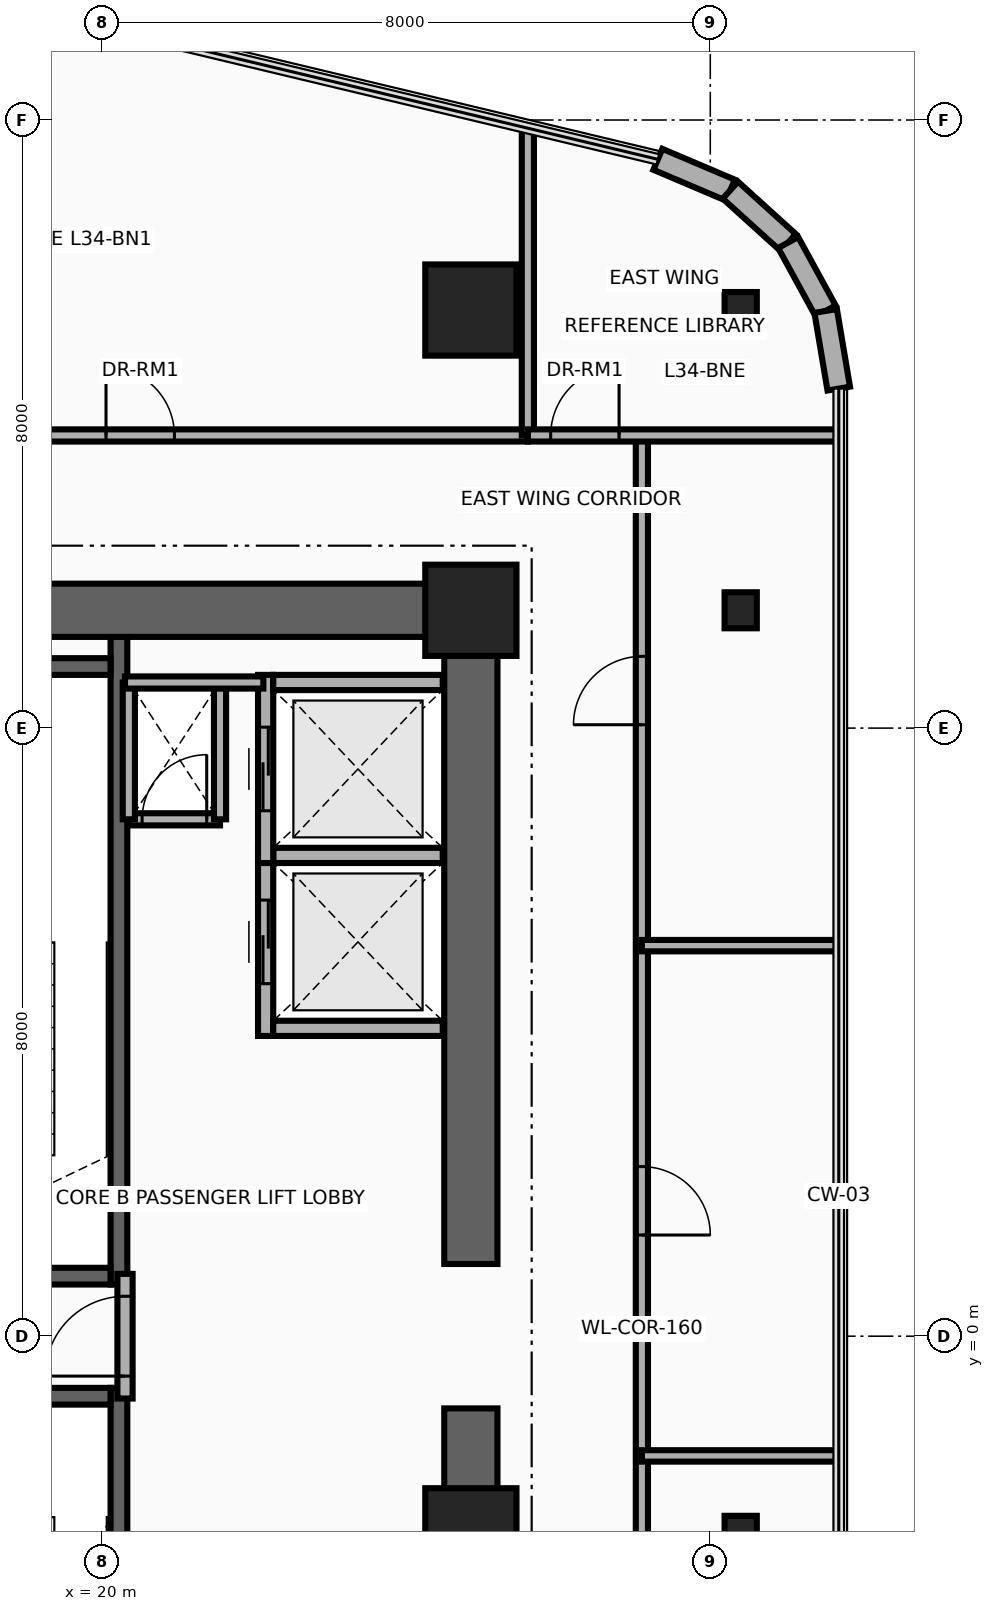
"""IFC4 building model, lengths in metres.
Left out: names, types, materials, properties, quantities, classifications, styles, units other than length and angle.
Written with IfcOpenShell. Run it as: python <this file> out.ifc"""

import sys

from ifc_helpers import new_model, si_unit, direction, frame, frame_2d, origin, origin_2d, place, context, subcontext, project, spatial, rectangle, i_section, extrude, source, transform, mapped, element, fill, save


model = new_model("IFC4")
c1 = context("Model", 3, precision=1e-05, world=origin(), true_north=direction((0.0, 1.0)))
c2 = subcontext(c1, "Body", "Model", "MODEL_VIEW")
j1 = project(units=[si_unit("LENGTHUNIT", "METRE"), si_unit("PLANEANGLEUNIT", "RADIAN")], contexts=[c1])
p1 = place(None, origin())
s1 = spatial("IfcSite", under=j1, at=p1, CompositionType="ELEMENT")
p2 = place(p1, origin())
s2 = spatial("IfcBuilding", under=s1, at=p2, CompositionType="ELEMENT")
p3 = place(p2, frame((0.0, 0.0, 135.3)))
s3 = spatial("IfcBuildingStorey", under=s2, at=p3, CompositionType="ELEMENT", Elevation=135.3)
p4 = place(p3, frame((20.22, 0.68, 0.0), z_axis=(0.0, 0.0, 1.0), x_axis=(0.0, 1.0, 0.0)))
e1 = element("IfcWall", 1, at=p4, inside=s3, PredefinedType="SHEAR", context=c2, shape_type="SweptSolid", body=[
    extrude(rectangle(XDim=8.52, YDim=0.22, at=frame_2d((4.26, 0.0))), origin(), (0.0, 0.0, 1.0), 3.46),
])
p5 = place(p3, frame((17.0, 0.79, 0.0), z_axis=(0.0, 0.0, 1.0), x_axis=(1.0, 0.0, 0.0)))
e2 = element("IfcWall", 2, at=p5, inside=s3, PredefinedType="SHEAR", context=c2, shape_type="SweptSolid", body=[
    extrude(rectangle(XDim=3.11, YDim=0.22, at=frame_2d((1.555, 0.0))), origin(), (0.0, 0.0, 1.0), 3.46),
])
p6 = place(p5, frame((0.95, 0.0, 0.0)))
e3 = element("IfcOpeningElement", 3, at=p6, cuts=e2, PredefinedType="OPENING", context=c2, shape_type="SweptSolid", body=[
    extrude(rectangle(XDim=1.1, YDim=2.15, at=frame_2d((0.55, 1.075))), frame((0.0, 0.125, 0.0), z_axis=(0.0, -1.0, 0.0), x_axis=(1.0, 0.0, 0.0)), (0.0, 0.0, 1.0), 0.25),
])
p7 = place(p3, frame((17.0, 8.81, 0.0), z_axis=(0.0, 0.0, 1.0), x_axis=(1.0, 0.0, 0.0)))
e4 = element("IfcWall", 4, at=p7, inside=s3, PredefinedType="SHEAR", context=c2, shape_type="SweptSolid", body=[
    extrude(rectangle(XDim=3.11, YDim=0.22, at=frame_2d((1.555, 0.0))), origin(), (0.0, 0.0, 1.0), 3.46),
])
p8 = place(p3, frame((20.22, -9.2, 0.0), z_axis=(0.0, 0.0, 1.0), x_axis=(0.0, 1.0, 0.0)))
e5 = element("IfcWall", 5, at=p8, inside=s3, PredefinedType="SHEAR", context=c2, shape_type="SweptSolid", body=[
    extrude(rectangle(XDim=8.52, YDim=0.22, at=frame_2d((4.26, 0.0))), origin(), (0.0, 0.0, 1.0), 3.46),
])
p9 = place(p3, frame((17.0, -0.79, 0.0), z_axis=(0.0, 0.0, 1.0), x_axis=(1.0, 0.0, 0.0)))
e6 = element("IfcWall", 6, at=p9, inside=s3, PredefinedType="SHEAR", context=c2, shape_type="SweptSolid", body=[
    extrude(rectangle(XDim=3.11, YDim=0.22, at=frame_2d((1.555, 0.0))), origin(), (0.0, 0.0, 1.0), 3.46),
])
p10 = place(p9, frame((0.95, 0.0, 0.0)))
e7 = element("IfcOpeningElement", 7, at=p10, cuts=e6, PredefinedType="OPENING", context=c2, shape_type="SweptSolid", body=[
    extrude(rectangle(XDim=1.1, YDim=2.15, at=frame_2d((0.55, 1.075))), frame((0.0, 0.125, 0.0), z_axis=(0.0, -1.0, 0.0), x_axis=(1.0, 0.0, 0.0)), (0.0, 0.0, 1.0), 0.25),
])
for number, where, z_axis, x_axis in (
    (8, (24.85, -9.9, 0.0), (0.0, 0.0, 1.0), (0.0, 1.0, 0.0)),
    (9, (24.85, 0.95, 0.0), (0.0, 0.0, 1.0), (0.0, 1.0, 0.0)),
):
    element("IfcWall", number, at=place(p3, frame(where, z_axis=z_axis, x_axis=x_axis)), inside=s3, PredefinedType="SHEAR", context=c2, shape_type="SweptSolid", body=[
        extrude(rectangle(XDim=8.95, YDim=0.7, at=frame_2d((4.475, 0.0))), origin(), (0.0, 0.0, 1.0), 3.46),
    ])
p11 = place(p3, frame((15.85, 9.55, 0.0), z_axis=(0.0, 0.0, 1.0), x_axis=(1.0, 0.0, 0.0)))
e10 = element("IfcWall", 10, at=p11, inside=s3, PredefinedType="SHEAR", context=c2, shape_type="SweptSolid", body=[
    extrude(rectangle(XDim=9.0, YDim=0.7, at=frame_2d((4.5, 0.0))), origin(), (0.0, 0.0, 1.0), 3.46),
])
m1 = source(origin(), c2, "Body", "SweptSolid", [
    extrude(rectangle(XDim=1.2, YDim=1.2, at=origin_2d()), origin(), (0.0, 0.0, 1.0), 3.7),
])
p12 = place(p3, frame((24.85, -2.6, 0.0), z_axis=(0.0, 0.0, 1.0), x_axis=(1.0, 0.0, 0.0)))
e11 = element("IfcColumn", 11, at=p12, inside=s3, PredefinedType="COLUMN", context=c2, shape_type="MappedRepresentation", body=[
    mapped(m1, transform((0.0, 0.0, 0.0), x_axis=(1.0, 0.0, 0.0), y_axis=(0.0, 1.0, 0.0), z_axis=(0.0, 0.0, 1.0), scale=1.0)),
])
m2 = source(origin(), c2, "Body", "SweptSolid", [
    extrude(i_section(OverallWidth=0.424, OverallDepth=0.474, WebThickness=0.048, FlangeThickness=0.077, at=origin_2d()), origin(), (0.0, 0.0, 1.0), 3.7),
])
p13 = place(p3, frame((28.4, -2.6, 0.0), z_axis=(0.0, 0.0, 1.0), x_axis=(1.0, 0.0, 0.0)))
e12 = element("IfcColumn", 12, at=p13, inside=s3, PredefinedType="COLUMN", context=c2, shape_type="MappedRepresentation", body=[
    mapped(m2, transform((0.0, 0.0, 0.0), x_axis=(1.0, 0.0, 0.0), y_axis=(0.0, 1.0, 0.0), z_axis=(0.0, 0.0, 1.0), scale=1.0)),
])
p14 = place(p3, frame((24.85, 9.55, 0.0), z_axis=(0.0, 0.0, 1.0), x_axis=(1.0, 0.0, 0.0)))
e13 = element("IfcColumn", 13, at=p14, inside=s3, PredefinedType="COLUMN", context=c2, shape_type="MappedRepresentation", body=[
    mapped(m1, transform((0.0, 0.0, 0.0), x_axis=(1.0, 0.0, 0.0), y_axis=(0.0, 1.0, 0.0), z_axis=(0.0, 0.0, 1.0), scale=1.0)),
])
p15 = place(p3, frame((28.4, 9.55, 0.0), z_axis=(0.0, 0.0, 1.0), x_axis=(1.0, 0.0, 0.0)))
e14 = element("IfcColumn", 14, at=p15, inside=s3, PredefinedType="COLUMN", context=c2, shape_type="MappedRepresentation", body=[
    mapped(m2, transform((0.0, 0.0, 0.0), x_axis=(1.0, 0.0, 0.0), y_axis=(0.0, 1.0, 0.0), z_axis=(0.0, 0.0, 1.0), scale=1.0)),
])
p16 = place(p3, frame((24.85, 13.5, 0.0), z_axis=(0.0, 0.0, 1.0), x_axis=(1.0, 0.0, 0.0)))
e15 = element("IfcColumn", 15, at=p16, inside=s3, PredefinedType="COLUMN", context=c2, shape_type="MappedRepresentation", body=[
    mapped(m1, transform((0.0, 0.0, 0.0), x_axis=(1.0, 0.0, 0.0), y_axis=(0.0, 1.0, 0.0), z_axis=(0.0, 0.0, 1.0), scale=1.0)),
])
p17 = place(p3, frame((28.4, 13.5, 0.0), z_axis=(0.0, 0.0, 1.0), x_axis=(1.0, 0.0, 0.0)))
e16 = element("IfcColumn", 16, at=p17, inside=s3, PredefinedType="COLUMN", context=c2, shape_type="MappedRepresentation", body=[
    mapped(m2, transform((0.0, 0.0, 0.0), x_axis=(1.0, 0.0, 0.0), y_axis=(0.0, 1.0, 0.0), z_axis=(0.0, 0.0, 1.0), scale=1.0)),
])
p18 = place(p3, frame((27.31, 15.483, 0.0), z_axis=(0.0, 0.0, 1.0), x_axis=(0.920250328759, -0.391330208927, 0.0)))
e17 = element("IfcWall", 17, at=p18, inside=s3, PredefinedType="SOLIDWALL", context=c2, shape_type="SweptSolid", body=[
    extrude(rectangle(XDim=1.036, YDim=0.3, at=frame_2d((0.518, 0.0))), origin(), (0.0, 0.0, 1.0), 3.46),
])
p19 = place(p3, frame((28.264, 15.077, 0.0), z_axis=(0.0, 0.0, 1.0), x_axis=(0.741208839713, -0.671274501178, 0.0)))
e18 = element("IfcWall", 18, at=p19, inside=s3, PredefinedType="SOLIDWALL", context=c2, shape_type="SweptSolid", body=[
    extrude(rectangle(XDim=1.026, YDim=0.3, at=frame_2d((0.513, 0.0))), origin(), (0.0, 0.0, 1.0), 3.46),
])
p20 = place(p3, frame((29.025, 14.388, 0.0), z_axis=(0.0, 0.0, 1.0), x_axis=(0.480284137298, -0.87711296163, 0.0)))
e19 = element("IfcWall", 19, at=p20, inside=s3, PredefinedType="SOLIDWALL", context=c2, shape_type="SweptSolid", body=[
    extrude(rectangle(XDim=1.027, YDim=0.3, at=frame_2d((0.513, 0.0))), origin(), (0.0, 0.0, 1.0), 3.46),
])
p21 = place(p3, frame((29.518, 13.488, 0.0), z_axis=(0.0, 0.0, 1.0), x_axis=(0.166156796952, -0.986099345313, 0.0)))
e20 = element("IfcWall", 20, at=p21, inside=s3, PredefinedType="SOLIDWALL", context=c2, shape_type="SweptSolid", body=[
    extrude(rectangle(XDim=1.036, YDim=0.3, at=frame_2d((0.518, 0.0))), origin(), (0.0, 0.0, 1.0), 3.46),
])
p22 = place(p3, frame((22.15, 3.95, 0.0), z_axis=(0.0, 0.0, 1.0), x_axis=(0.0, 1.0, 0.0)))
e21 = element("IfcWall", 21, at=p22, inside=s3, PredefinedType="MOVABLE", context=c2, shape_type="SweptSolid", body=[
    extrude(rectangle(XDim=2.475, YDim=0.2, at=frame_2d((1.238, 0.0))), origin(), (0.0, 0.0, 1.0), 3.46),
])
p23 = place(p22, frame((0.688, 0.0, 0.0)))
e22 = element("IfcOpeningElement", 22, at=p23, cuts=e21, PredefinedType="OPENING", context=c2, shape_type="SweptSolid", body=[
    extrude(rectangle(XDim=1.1, YDim=2.1, at=frame_2d((0.55, 1.05))), frame((0.0, 0.115, 0.0), z_axis=(0.0, -1.0, 0.0), x_axis=(1.0, 0.0, 0.0)), (0.0, 0.0, 1.0), 0.23),
])
for number, where, z_axis, x_axis in (
    (23, (22.25, 4.05, 0.0), (0.0, 0.0, 1.0), (1.0, 0.0, 0.0)),
    (24, (22.25, 6.325, 0.0), (0.0, 0.0, 1.0), (1.0, 0.0, 0.0)),
):
    element("IfcWall", number, at=place(p3, frame(where, z_axis=z_axis, x_axis=x_axis)), inside=s3, PredefinedType="MOVABLE", context=c2, shape_type="SweptSolid", body=[
        extrude(rectangle(XDim=2.23, YDim=0.2, at=frame_2d((1.115, 0.0))), origin(), (0.0, 0.0, 1.0), 2.245),
    ])
p24 = place(p3, frame((22.15, 6.225, 0.0), z_axis=(0.0, 0.0, 1.0), x_axis=(0.0, 1.0, 0.0)))
e25 = element("IfcWall", 25, at=p24, inside=s3, PredefinedType="MOVABLE", context=c2, shape_type="SweptSolid", body=[
    extrude(rectangle(XDim=2.475, YDim=0.2, at=frame_2d((1.237, 0.0))), origin(), (0.0, 0.0, 1.0), 3.46),
])
p25 = place(p24, frame((0.688, 0.0, 0.0)))
e26 = element("IfcOpeningElement", 26, at=p25, cuts=e25, PredefinedType="OPENING", context=c2, shape_type="SweptSolid", body=[
    extrude(rectangle(XDim=1.1, YDim=2.1, at=frame_2d((0.55, 1.05))), frame((0.0, 0.115, 0.0), z_axis=(0.0, -1.0, 0.0), x_axis=(1.0, 0.0, 0.0)), (0.0, 0.0, 1.0), 0.23),
])
p26 = place(p3, frame((22.25, 8.6, 0.0), z_axis=(0.0, 0.0, 1.0), x_axis=(1.0, 0.0, 0.0)))
e27 = element("IfcWall", 27, at=p26, inside=s3, PredefinedType="MOVABLE", context=c2, shape_type="SweptSolid", body=[
    extrude(rectangle(XDim=2.23, YDim=0.2, at=frame_2d((1.115, 0.0))), origin(), (0.0, 0.0, 1.0), 2.245),
])
p27 = place(p3, frame((20.3, -0.82, 0.0), z_axis=(0.0, 0.0, 1.0), x_axis=(0.0, 1.0, 0.0)))
e28 = element("IfcWall", 28, at=p27, inside=s3, PredefinedType="PARTITIONING", context=c2, shape_type="SweptSolid", body=[
    extrude(rectangle(XDim=1.64, YDim=0.2, at=frame_2d((0.82, 0.0))), origin(), (0.0, 0.0, 1.0), 3.46),
])
p28 = place(p27, frame((0.295, 0.0, 0.0)))
e29 = element("IfcOpeningElement", 29, at=p28, cuts=e28, PredefinedType="OPENING", context=c2, shape_type="SweptSolid", body=[
    extrude(rectangle(XDim=1.05, YDim=2.15, at=frame_2d((0.525, 1.075))), frame((0.0, 0.115, 0.0), z_axis=(0.0, -1.0, 0.0), x_axis=(1.0, 0.0, 0.0)), (0.0, 0.0, 1.0), 0.23),
])
p29 = place(p3, frame((20.35, 6.8, 0.0), z_axis=(0.0, 0.0, 1.0), x_axis=(1.0, 0.0, 0.0)))
e30 = element("IfcWall", 30, at=p29, inside=s3, PredefinedType="PARTITIONING", context=c2, shape_type="SweptSolid", body=[
    extrude(rectangle(XDim=1.2, YDim=0.16, at=frame_2d((0.6, 0.0))), origin(), (0.0, 0.0, 1.0), 3.46),
])
p30 = place(p29, frame((0.175, 0.0, 0.0)))
e31 = element("IfcOpeningElement", 31, at=p30, cuts=e30, PredefinedType="OPENING", context=c2, shape_type="SweptSolid", body=[
    extrude(rectangle(XDim=0.85, YDim=2.05, at=frame_2d((0.425, 1.025))), frame((0.0, 0.095, 0.0), z_axis=(0.0, -1.0, 0.0), x_axis=(1.0, 0.0, 0.0)), (0.0, 0.0, 1.0), 0.19),
])
for number, where, z_axis, x_axis in (
    (32, (21.55, 6.8, 0.0), (0.0, 0.0, 1.0), (0.0, 1.0, 0.0)),
    (33, (20.35, 6.8, 0.0), (0.0, 0.0, 1.0), (0.0, 1.0, 0.0)),
):
    element("IfcWall", number, at=place(p3, frame(where, z_axis=z_axis, x_axis=x_axis)), inside=s3, PredefinedType="PARTITIONING", context=c2, shape_type="SweptSolid", body=[
        extrude(rectangle(XDim=1.8, YDim=0.16, at=frame_2d((0.9, 0.0))), origin(), (0.0, 0.0, 1.0), 3.46),
    ])
p31 = place(p3, frame((20.3, 8.6, 0.0), z_axis=(0.0, 0.0, 1.0), x_axis=(1.0, 0.0, 0.0)))
e34 = element("IfcWall", 34, at=p31, inside=s3, PredefinedType="PARTITIONING", context=c2, shape_type="SweptSolid", body=[
    extrude(rectangle(XDim=1.82, YDim=0.16, at=frame_2d((0.91, 0.0))), origin(), (0.0, 0.0, 1.0), 3.46),
])
p32 = place(p3, frame((15.4, 11.85, 0.0), z_axis=(0.0, 0.0, 1.0), x_axis=(1.0, 0.0, 0.0)))
e35 = element("IfcWall", 35, at=p32, inside=s3, PredefinedType="PARTITIONING", context=c2, shape_type="SweptSolid", body=[
    extrude(rectangle(XDim=10.2, YDim=0.16, at=frame_2d((5.1, 0.0))), origin(), (0.0, 0.0, 1.0), 2.834),
])
p33 = place(p32, frame((4.65, 0.0, 0.0)))
e36 = element("IfcOpeningElement", 36, at=p33, cuts=e35, PredefinedType="OPENING", context=c2, shape_type="SweptSolid", body=[
    extrude(rectangle(XDim=0.9, YDim=2.1, at=frame_2d((0.45, 1.05))), frame((0.0, 0.095, 0.0), z_axis=(0.0, -1.0, 0.0), x_axis=(1.0, 0.0, 0.0)), (0.0, 0.0, 1.0), 0.19),
])
p34 = place(p3, frame((25.6, 11.85, 0.0), z_axis=(0.0, 0.0, 1.0), x_axis=(0.0, 1.0, 0.0)))
e37 = element("IfcWall", 37, at=p34, inside=s3, PredefinedType="PARTITIONING", context=c2, shape_type="SweptSolid", body=[
    extrude(rectangle(XDim=4.042, YDim=0.16, at=frame_2d((2.021, 0.0))), origin(), (0.0, 0.0, 1.0), 2.666),
])
p35 = place(p3, frame((27.1, -11.661, 0.0), z_axis=(0.0, 0.0, 1.0), x_axis=(0.0, 1.0, 0.0)))
e38 = element("IfcWall", 38, at=p35, inside=s3, PredefinedType="PARTITIONING", context=c2, shape_type="SweptSolid", body=[
    extrude(rectangle(XDim=23.511, YDim=0.16, at=frame_2d((11.755, 0.0))), origin(), (0.0, 0.0, 1.0), 2.666),
])
p36 = place(p35, frame((0.8, 0.0, 0.0)))
e39 = element("IfcOpeningElement", 39, at=p36, cuts=e38, PredefinedType="OPENING", context=c2, shape_type="SweptSolid", body=[
    extrude(rectangle(XDim=0.9, YDim=2.1, at=frame_2d((0.45, 1.05))), frame((0.0, 0.095, 0.0), z_axis=(0.0, -1.0, 0.0), x_axis=(1.0, 0.0, 0.0)), (0.0, 0.0, 1.0), 0.19),
])
p37 = place(p35, frame((6.28, 0.0, 0.0)))
e40 = element("IfcOpeningElement", 40, at=p37, cuts=e38, PredefinedType="OPENING", context=c2, shape_type="SweptSolid", body=[
    extrude(rectangle(XDim=0.9, YDim=2.1, at=frame_2d((0.45, 1.05))), frame((0.0, 0.095, 0.0), z_axis=(0.0, -1.0, 0.0), x_axis=(1.0, 0.0, 0.0)), (0.0, 0.0, 1.0), 0.19),
])
p38 = place(p35, frame((12.992, 0.0, 0.0)))
e41 = element("IfcOpeningElement", 41, at=p38, cuts=e38, PredefinedType="OPENING", context=c2, shape_type="SweptSolid", body=[
    extrude(rectangle(XDim=0.9, YDim=2.1, at=frame_2d((0.45, 1.05))), frame((0.0, 0.095, 0.0), z_axis=(0.0, -1.0, 0.0), x_axis=(1.0, 0.0, 0.0)), (0.0, 0.0, 1.0), 0.19),
])
p39 = place(p35, frame((19.705, 0.0, 0.0)))
e42 = element("IfcOpeningElement", 42, at=p39, cuts=e38, PredefinedType="OPENING", context=c2, shape_type="SweptSolid", body=[
    extrude(rectangle(XDim=0.9, YDim=2.1, at=frame_2d((0.45, 1.05))), frame((0.0, 0.095, 0.0), z_axis=(0.0, -1.0, 0.0), x_axis=(1.0, 0.0, 0.0)), (0.0, 0.0, 1.0), 0.19),
])
p40 = place(p3, frame((25.6, 11.85, 0.0), z_axis=(0.0, 0.0, 1.0), x_axis=(1.0, 0.0, 0.0)))
e43 = element("IfcWall", 43, at=p40, inside=s3, PredefinedType="PARTITIONING", context=c2, shape_type="SweptSolid", body=[
    extrude(rectangle(XDim=4.09, YDim=0.16, at=frame_2d((2.045, 0.0))), origin(), (0.0, 0.0, 1.0), 2.896),
])
p41 = place(p40, frame((0.3, 0.0, 0.0)))
e44 = element("IfcOpeningElement", 44, at=p41, cuts=e43, PredefinedType="OPENING", context=c2, shape_type="SweptSolid", body=[
    extrude(rectangle(XDim=0.9, YDim=2.1, at=frame_2d((0.45, 1.05))), frame((0.0, 0.095, 0.0), z_axis=(0.0, -1.0, 0.0), x_axis=(1.0, 0.0, 0.0)), (0.0, 0.0, 1.0), 0.19),
])
for number, where, z_axis, x_axis in (
    (45, (27.1, -1.575, 0.0), (0.0, 0.0, 1.0), (1.0, 0.0, 0.0)),
    (46, (27.1, 5.138, 0.0), (0.0, 0.0, 1.0), (1.0, 0.0, 0.0)),
):
    element("IfcWall", number, at=place(p3, frame(where, z_axis=z_axis, x_axis=x_axis)), inside=s3, PredefinedType="PARTITIONING", context=c2, shape_type="SweptSolid", body=[
        extrude(rectangle(XDim=2.59, YDim=0.15, at=frame_2d((1.295, 0.0))), origin(), (0.0, 0.0, 1.0), 2.896),
    ])
p42 = place(p23, origin())
e47 = element("IfcDoor", 47, at=p42, inside=s3, OperationType="DOUBLE_DOOR_SLIDING", PredefinedType="DOOR", context=c2, shape_type="SweptSolid", body=[
    extrude(rectangle(XDim=1.1, YDim=2.1, at=frame_2d((0.55, 1.05))), frame((0.0, 0.025, 0.0), z_axis=(0.0, -1.0, 0.0), x_axis=(1.0, 0.0, 0.0)), (0.0, 0.0, 1.0), 0.05),
])
fill(e22, e47)
p43 = place(p25, origin())
e48 = element("IfcDoor", 48, at=p43, inside=s3, OperationType="DOUBLE_DOOR_SLIDING", PredefinedType="DOOR", context=c2, shape_type="SweptSolid", body=[
    extrude(rectangle(XDim=1.1, YDim=2.1, at=frame_2d((0.55, 1.05))), frame((0.0, 0.025, 0.0), z_axis=(0.0, -1.0, 0.0), x_axis=(1.0, 0.0, 0.0)), (0.0, 0.0, 1.0), 0.05),
])
fill(e26, e48)
p44 = place(p28, origin())
e49 = element("IfcDoor", 49, at=p44, inside=s3, OperationType="SINGLE_SWING_RIGHT", PredefinedType="DOOR", context=c2, shape_type="SweptSolid", body=[
    extrude(rectangle(XDim=1.05, YDim=2.15, at=frame_2d((0.525, 1.075))), frame((0.0, 0.025, 0.0), z_axis=(0.0, -1.0, 0.0), x_axis=(1.0, 0.0, 0.0)), (0.0, 0.0, 1.0), 0.05),
])
fill(e29, e49)
p45 = place(p30, origin())
e50 = element("IfcDoor", 50, at=p45, inside=s3, OperationType="SINGLE_SWING_LEFT", PredefinedType="DOOR", context=c2, shape_type="SweptSolid", body=[
    extrude(rectangle(XDim=0.85, YDim=2.05, at=frame_2d((0.425, 1.025))), frame((0.0, 0.025, 0.0), z_axis=(0.0, -1.0, 0.0), x_axis=(1.0, 0.0, 0.0)), (0.0, 0.0, 1.0), 0.05),
])
fill(e31, e50)
p46 = place(p33, origin())
e51 = element("IfcDoor", 51, at=p46, inside=s3, OperationType="SINGLE_SWING_RIGHT", PredefinedType="DOOR", context=c2, shape_type="SweptSolid", body=[
    extrude(rectangle(XDim=0.9, YDim=2.1, at=frame_2d((0.45, 1.05))), frame((0.0, 0.025, 0.0), z_axis=(0.0, -1.0, 0.0), x_axis=(1.0, 0.0, 0.0)), (0.0, 0.0, 1.0), 0.05),
])
fill(e36, e51)
p47 = place(p41, origin())
e52 = element("IfcDoor", 52, at=p47, inside=s3, OperationType="SINGLE_SWING_RIGHT", PredefinedType="DOOR", context=c2, shape_type="SweptSolid", body=[
    extrude(rectangle(XDim=0.9, YDim=2.1, at=frame_2d((0.45, 1.05))), frame((0.0, 0.025, 0.0), z_axis=(0.0, -1.0, 0.0), x_axis=(1.0, 0.0, 0.0)), (0.0, 0.0, 1.0), 0.05),
])
fill(e44, e52)
p48 = place(p38, frame((0.9, 0.0, 0.0), z_axis=(0.0, 0.0, 1.0), x_axis=(-1.0, 0.0, 0.0)))
e53 = element("IfcDoor", 53, at=p48, inside=s3, OperationType="SINGLE_SWING_LEFT", PredefinedType="DOOR", context=c2, shape_type="SweptSolid", body=[
    extrude(rectangle(XDim=0.9, YDim=2.1, at=frame_2d((0.45, 1.05))), frame((0.0, 0.025, 0.0), z_axis=(0.0, -1.0, 0.0), x_axis=(1.0, 0.0, 0.0)), (0.0, 0.0, 1.0), 0.05),
])
fill(e41, e53)
p49 = place(p39, origin())
e54 = element("IfcDoor", 54, at=p49, inside=s3, OperationType="SINGLE_SWING_RIGHT", PredefinedType="DOOR", context=c2, shape_type="SweptSolid", body=[
    extrude(rectangle(XDim=0.9, YDim=2.1, at=frame_2d((0.45, 1.05))), frame((0.0, 0.025, 0.0), z_axis=(0.0, -1.0, 0.0), x_axis=(1.0, 0.0, 0.0)), (0.0, 0.0, 1.0), 0.05),
])
fill(e42, e54)
save(model, sys.argv[1])
